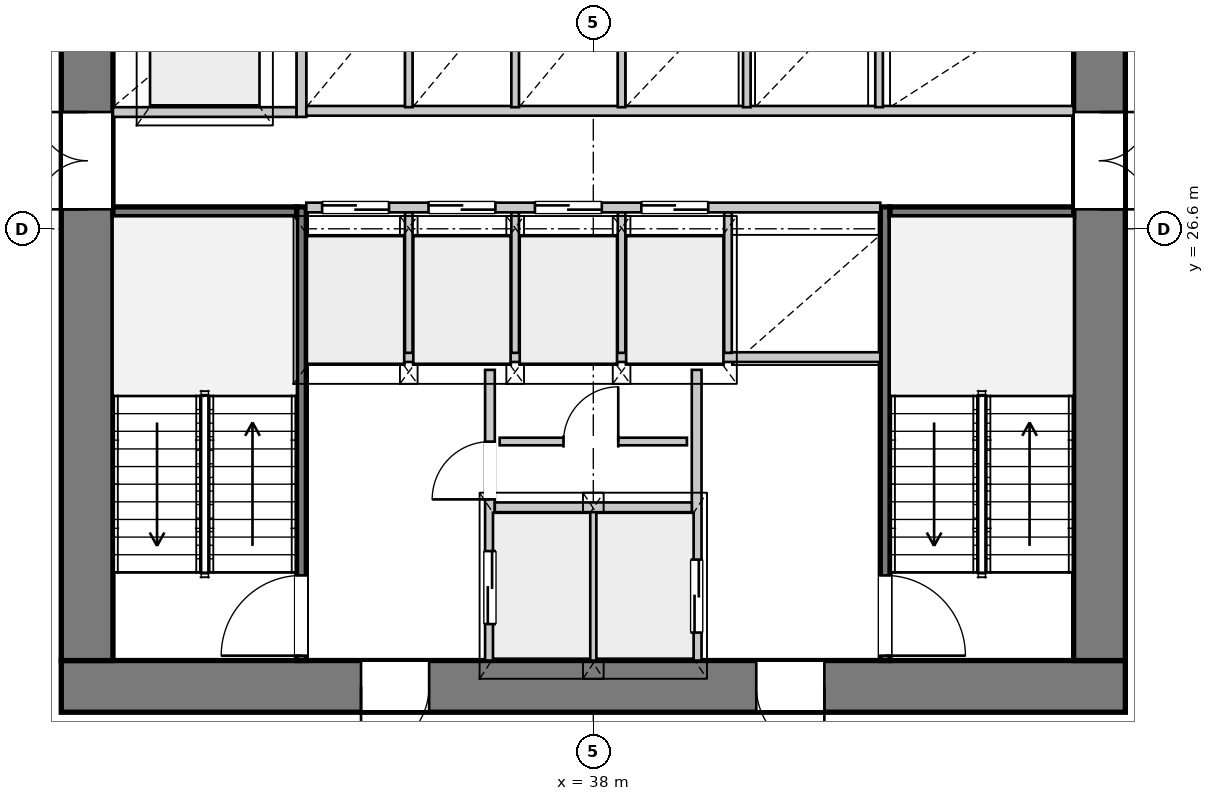
"""IFC4 building model, lengths in metres.
Left out: names, types, materials, properties, quantities, classifications, styles, units other than length and angle.
Written with IfcOpenShell. Run it as: python <this file> out.ifc"""

import sys

from ifc_helpers import new_model, si_unit, direction, frame, frame_2d, origin, place, context, subcontext, project, spatial, rectangle, extrude, source, transform, mapped, element, fill, save


model = new_model("IFC4")
c1 = context("Model", 3, precision=1e-05, world=origin(), true_north=direction((0.0, 1.0)))
c2 = subcontext(c1, "Body", "Model", "MODEL_VIEW")
j1 = project(units=[si_unit("LENGTHUNIT", "METRE"), si_unit("PLANEANGLEUNIT", "RADIAN")], contexts=[c1])
p1 = place(None, origin())
s1 = spatial("IfcSite", under=j1, at=p1, CompositionType="ELEMENT")
p2 = place(p1, origin())
s2 = spatial("IfcBuilding", under=s1, at=p2, CompositionType="ELEMENT")
p3 = place(p2, frame((0.0, 0.0, 57.7)))
s3 = spatial("IfcBuildingStorey", under=s2, at=p3, CompositionType="ELEMENT", Elevation=57.7)
p4 = place(p3, frame((46.75, 19.075, 0.0), z_axis=(0.0, 0.0, 1.0), x_axis=(-1.0, 0.0, 0.0)))
e1 = element("IfcWall", 1, at=p4, inside=s3, PredefinedType="SHEAR", context=c2, shape_type="SweptSolid", body=[
    extrude(rectangle(XDim=17.5, YDim=0.85, at=frame_2d((8.75, 0.0))), origin(), (0.0, 0.0, 1.0), 3.3),
])
p5 = place(p4, frame((4.95, 0.0, 0.0)))
e2 = element("IfcOpeningElement", 2, at=p5, cuts=e1, PredefinedType="OPENING", context=c2, shape_type="SweptSolid", body=[
    extrude(rectangle(XDim=1.12, YDim=2.25, at=frame_2d((0.56, 1.125))), frame((0.0, 0.435, 0.0), z_axis=(0.0, -1.0, 0.0), x_axis=(1.0, 0.0, 0.0)), (0.0, 0.0, 1.0), 0.87),
])
p6 = place(p4, frame((11.45, 0.0, 0.0)))
e3 = element("IfcOpeningElement", 3, at=p6, cuts=e1, PredefinedType="OPENING", context=c2, shape_type="SweptSolid", body=[
    extrude(rectangle(XDim=1.12, YDim=2.25, at=frame_2d((0.56, 1.125))), frame((0.0, 0.435, 0.0), z_axis=(0.0, -1.0, 0.0), x_axis=(1.0, 0.0, 0.0)), (0.0, 0.0, 1.0), 0.87),
])
p7 = place(p3, frame((29.675, 19.5, 0.0), z_axis=(0.0, 0.0, 1.0), x_axis=(0.0, 1.0, 0.0)))
e4 = element("IfcWall", 4, at=p7, inside=s3, PredefinedType="SHEAR", context=c2, shape_type="SweptSolid", body=[
    extrude(rectangle(XDim=14.2, YDim=0.85, at=frame_2d((7.1, 0.0))), origin(), (0.0, 0.0, 1.0), 3.3),
])
p8 = place(p7, frame((7.42, 0.0, 0.0)))
e5 = element("IfcOpeningElement", 5, at=p8, cuts=e4, PredefinedType="OPENING", context=c2, shape_type="SweptSolid", body=[
    extrude(rectangle(XDim=1.6, YDim=2.2, at=frame_2d((0.8, 1.1))), frame((0.0, 0.435, 0.0), z_axis=(0.0, -1.0, 0.0), x_axis=(1.0, 0.0, 0.0)), (0.0, 0.0, 1.0), 0.87),
])
p9 = place(p3, frame((46.325, 33.7, 0.0), z_axis=(0.0, 0.0, 1.0), x_axis=(0.0, -1.0, 0.0)))
e6 = element("IfcWall", 6, at=p9, inside=s3, PredefinedType="SHEAR", context=c2, shape_type="SweptSolid", body=[
    extrude(rectangle(XDim=14.2, YDim=0.85, at=frame_2d((7.1, 0.0))), origin(), (0.0, 0.0, 1.0), 3.3),
])
p10 = place(p9, frame((5.18, 0.0, 0.0)))
e7 = element("IfcOpeningElement", 7, at=p10, cuts=e6, PredefinedType="OPENING", context=c2, shape_type="SweptSolid", body=[
    extrude(rectangle(XDim=1.6, YDim=2.2, at=frame_2d((0.8, 1.1))), frame((0.0, 0.435, 0.0), z_axis=(0.0, -1.0, 0.0), x_axis=(1.0, 0.0, 0.0)), (0.0, 0.0, 1.0), 0.87),
])
p11 = place(p3, frame((33.2, 19.5, 0.0), z_axis=(0.0, 0.0, 1.0), x_axis=(0.0, 1.0, 0.0)))
e8 = element("IfcWall", 8, at=p11, inside=s3, PredefinedType="PARTITIONING", context=c2, shape_type="SweptSolid", body=[
    extrude(rectangle(XDim=7.46, YDim=0.16, at=frame_2d((3.73, 0.0))), origin(), (0.0, 0.0, 1.0), 3.3),
])
p12 = place(p11, frame((0.08, 0.0, 0.0)))
e9 = element("IfcOpeningElement", 9, at=p12, cuts=e8, PredefinedType="OPENING", context=c2, shape_type="SweptSolid", body=[
    extrude(rectangle(XDim=1.32, YDim=2.2, at=frame_2d((0.66, 1.1))), frame((0.0, 0.09, 0.0), z_axis=(0.0, -1.0, 0.0), x_axis=(1.0, 0.0, 0.0)), (0.0, 0.0, 1.0), 0.18),
])
p13 = place(p3, frame((30.1, 26.88, 0.0), z_axis=(0.0, 0.0, 1.0), x_axis=(1.0, 0.0, 0.0)))
e10 = element("IfcWall", 10, at=p13, inside=s3, PredefinedType="PARTITIONING", context=c2, shape_type="SweptSolid", body=[
    extrude(rectangle(XDim=3.02, YDim=0.16, at=frame_2d((1.51, 0.0))), origin(), (0.0, 0.0, 1.0), 3.3),
])
p14 = place(p3, frame((42.8, 26.96, 0.0), z_axis=(0.0, 0.0, 1.0), x_axis=(0.0, -1.0, 0.0)))
e11 = element("IfcWall", 11, at=p14, inside=s3, PredefinedType="PARTITIONING", context=c2, shape_type="SweptSolid", body=[
    extrude(rectangle(XDim=7.46, YDim=0.16, at=frame_2d((3.73, 0.0))), origin(), (0.0, 0.0, 1.0), 3.3),
])
p15 = place(p14, frame((6.06, 0.0, 0.0)))
e12 = element("IfcOpeningElement", 12, at=p15, cuts=e11, PredefinedType="OPENING", context=c2, shape_type="SweptSolid", body=[
    extrude(rectangle(XDim=1.32, YDim=2.2, at=frame_2d((0.66, 1.1))), frame((0.0, 0.09, 0.0), z_axis=(0.0, -1.0, 0.0), x_axis=(1.0, 0.0, 0.0)), (0.0, 0.0, 1.0), 0.18),
])
p16 = place(p3, frame((42.88, 26.88, 0.0), z_axis=(0.0, 0.0, 1.0), x_axis=(1.0, 0.0, 0.0)))
e13 = element("IfcWall", 13, at=p16, inside=s3, PredefinedType="PARTITIONING", context=c2, shape_type="SweptSolid", body=[
    extrude(rectangle(XDim=3.02, YDim=0.16, at=frame_2d((1.51, 0.0))), origin(), (0.0, 0.0, 1.0), 3.3),
])
p17 = place(p3, frame((36.3, 19.5, 0.0), z_axis=(0.0, 0.0, 1.0), x_axis=(0.0, 1.0, 0.0)))
e14 = element("IfcWall", 14, at=p17, inside=s3, PredefinedType="PARTITIONING", context=c2, shape_type="SweptSolid", body=[
    extrude(rectangle(XDim=4.78, YDim=0.16, at=frame_2d((2.39, 0.0))), origin(), (0.0, 0.0, 1.0), 3.3),
])
p18 = place(p17, frame((0.6, 0.0, 0.0)))
e15 = element("IfcOpeningElement", 15, at=p18, cuts=e14, PredefinedType="OPENING", context=c2, shape_type="SweptSolid", body=[
    extrude(rectangle(XDim=1.2, YDim=2.2, at=frame_2d((0.6, 1.1))), frame((0.0, 0.09, 0.0), z_axis=(0.0, -1.0, 0.0), x_axis=(1.0, 0.0, 0.0)), (0.0, 0.0, 1.0), 0.18),
])
p19 = place(p17, frame((2.65, 0.0, 0.0)))
e16 = element("IfcOpeningElement", 16, at=p19, cuts=e14, PredefinedType="OPENING", context=c2, shape_type="SweptSolid", body=[
    extrude(rectangle(XDim=0.95, YDim=2.1, at=frame_2d((0.475, 1.05))), frame((0.0, 0.09, 0.0), z_axis=(0.0, -1.0, 0.0), x_axis=(1.0, 0.0, 0.0)), (0.0, 0.0, 1.0), 0.18),
])
p20 = place(p3, frame((39.7, 24.28, 0.0), z_axis=(0.0, 0.0, 1.0), x_axis=(0.0, -1.0, 0.0)))
e17 = element("IfcWall", 17, at=p20, inside=s3, PredefinedType="PARTITIONING", context=c2, shape_type="SweptSolid", body=[
    extrude(rectangle(XDim=4.78, YDim=0.16, at=frame_2d((2.39, 0.0))), origin(), (0.0, 0.0, 1.0), 3.3),
])
p21 = place(p20, frame((3.12, 0.0, 0.0)))
e18 = element("IfcOpeningElement", 18, at=p21, cuts=e17, PredefinedType="OPENING", context=c2, shape_type="SweptSolid", body=[
    extrude(rectangle(XDim=1.2, YDim=2.2, at=frame_2d((0.6, 1.1))), frame((0.0, 0.09, 0.0), z_axis=(0.0, -1.0, 0.0), x_axis=(1.0, 0.0, 0.0)), (0.0, 0.0, 1.0), 0.18),
])
p22 = place(p3, frame((38.0, 19.5, 0.0), z_axis=(0.0, 0.0, 1.0), x_axis=(0.0, 1.0, 0.0)))
e19 = element("IfcWall", 19, at=p22, inside=s3, PredefinedType="PARTITIONING", context=c2, shape_type="SweptSolid", body=[
    extrude(rectangle(XDim=2.46, YDim=0.125, at=frame_2d((1.23, 0.0))), origin(), (0.0, 0.0, 1.0), 3.3),
])
p23 = place(p3, frame((36.38, 22.02, 0.0), z_axis=(0.0, 0.0, 1.0), x_axis=(1.0, 0.0, 0.0)))
e20 = element("IfcWall", 20, at=p23, inside=s3, PredefinedType="PARTITIONING", context=c2, shape_type="SweptSolid", body=[
    extrude(rectangle(XDim=3.24, YDim=0.16, at=frame_2d((1.62, 0.0))), origin(), (0.0, 0.0, 1.0), 3.3),
])
p24 = place(p3, frame((33.28, 24.49, 0.0), z_axis=(0.0, 0.0, 1.0), x_axis=(1.0, 0.0, 0.0)))
e21 = element("IfcWall", 21, at=p24, inside=s3, PredefinedType="PARTITIONING", context=c2, shape_type="SweptSolid", body=[
    extrude(rectangle(XDim=9.44, YDim=0.16, at=frame_2d((4.72, 0.0))), origin(), (0.0, 0.0, 1.0), 3.3),
])
p25 = place(p3, frame((36.46, 23.102, 0.0), z_axis=(0.0, 0.0, 1.0), x_axis=(1.0, 0.0, 0.0)))
e22 = element("IfcWall", 22, at=p25, inside=s3, PredefinedType="PARTITIONING", context=c2, shape_type="SweptSolid", body=[
    extrude(rectangle(XDim=3.08, YDim=0.125, at=frame_2d((1.54, 0.0))), origin(), (0.0, 0.0, 1.0), 3.3),
])
p26 = place(p25, frame((1.05, 0.0, 0.0)))
e23 = element("IfcOpeningElement", 23, at=p26, cuts=e22, PredefinedType="OPENING", context=c2, shape_type="SweptSolid", body=[
    extrude(rectangle(XDim=0.9, YDim=2.1, at=frame_2d((0.45, 1.05))), frame((0.0, 0.073, 0.0), z_axis=(0.0, -1.0, 0.0), x_axis=(1.0, 0.0, 0.0)), (0.0, 0.0, 1.0), 0.145),
])
p27 = place(p3, frame((30.1, 28.52, 0.0), z_axis=(0.0, 0.0, 1.0), x_axis=(1.0, 0.0, 0.0)))
e24 = element("IfcWall", 24, at=p27, inside=s3, PredefinedType="PARTITIONING", context=c2, shape_type="SweptSolid", body=[
    extrude(rectangle(XDim=3.02, YDim=0.16, at=frame_2d((1.51, 0.0))), origin(), (0.0, 0.0, 1.0), 3.3),
])
p28 = place(p3, frame((33.2, 28.44, 0.0), z_axis=(0.0, 0.0, 1.0), x_axis=(0.0, 1.0, 0.0)))
e25 = element("IfcWall", 25, at=p28, inside=s3, PredefinedType="PARTITIONING", context=c2, shape_type="SweptSolid", body=[
    extrude(rectangle(XDim=5.26, YDim=0.16, at=frame_2d((2.63, 0.0))), origin(), (0.0, 0.0, 1.0), 3.3),
])
p29 = place(p3, frame((33.28, 26.95, 0.0), z_axis=(0.0, 0.0, 1.0), x_axis=(1.0, 0.0, 0.0)))
e26 = element("IfcWall", 26, at=p29, inside=s3, PredefinedType="PARTITIONING", context=c2, shape_type="SweptSolid", body=[
    extrude(rectangle(XDim=9.44, YDim=0.16, at=frame_2d((4.72, 0.0))), origin(), (0.0, 0.0, 1.0), 3.3),
])
p30 = place(p29, frame((0.26, 0.0, 0.0)))
e27 = element("IfcOpeningElement", 27, at=p30, cuts=e26, PredefinedType="OPENING", context=c2, shape_type="SweptSolid", body=[
    extrude(rectangle(XDim=1.1, YDim=2.2, at=frame_2d((0.55, 1.1))), frame((0.0, 0.09, 0.0), z_axis=(0.0, -1.0, 0.0), x_axis=(1.0, 0.0, 0.0)), (0.0, 0.0, 1.0), 0.18),
])
p31 = place(p29, frame((2.01, 0.0, 0.0)))
e28 = element("IfcOpeningElement", 28, at=p31, cuts=e26, PredefinedType="OPENING", context=c2, shape_type="SweptSolid", body=[
    extrude(rectangle(XDim=1.1, YDim=2.2, at=frame_2d((0.55, 1.1))), frame((0.0, 0.09, 0.0), z_axis=(0.0, -1.0, 0.0), x_axis=(1.0, 0.0, 0.0)), (0.0, 0.0, 1.0), 0.18),
])
p32 = place(p29, frame((3.76, 0.0, 0.0)))
e29 = element("IfcOpeningElement", 29, at=p32, cuts=e26, PredefinedType="OPENING", context=c2, shape_type="SweptSolid", body=[
    extrude(rectangle(XDim=1.1, YDim=2.2, at=frame_2d((0.55, 1.1))), frame((0.0, 0.09, 0.0), z_axis=(0.0, -1.0, 0.0), x_axis=(1.0, 0.0, 0.0)), (0.0, 0.0, 1.0), 0.18),
])
p33 = place(p29, frame((5.51, 0.0, 0.0)))
e30 = element("IfcOpeningElement", 30, at=p33, cuts=e26, PredefinedType="OPENING", context=c2, shape_type="SweptSolid", body=[
    extrude(rectangle(XDim=1.1, YDim=2.2, at=frame_2d((0.55, 1.1))), frame((0.0, 0.09, 0.0), z_axis=(0.0, -1.0, 0.0), x_axis=(1.0, 0.0, 0.0)), (0.0, 0.0, 1.0), 0.18),
])
for number, where, z_axis, x_axis in (
    (31, (34.965, 24.56, 0.0), (0.0, 0.0, 1.0), (0.0, 1.0, 0.0)),
    (32, (36.715, 24.56, 0.0), (0.0, 0.0, 1.0), (0.0, 1.0, 0.0)),
    (33, (38.465, 24.56, 0.0), (0.0, 0.0, 1.0), (0.0, 1.0, 0.0)),
    (34, (40.215, 24.56, 0.0), (0.0, 0.0, 1.0), (0.0, 1.0, 0.0)),
):
    element("IfcWall", number, at=place(p3, frame(where, z_axis=z_axis, x_axis=x_axis)), inside=s3, PredefinedType="PARTITIONING", context=c2, shape_type="SweptSolid", body=[
        extrude(rectangle(XDim=2.31, YDim=0.125, at=frame_2d((1.155, 0.0))), origin(), (0.0, 0.0, 1.0), 3.3),
    ])
p34 = place(p3, frame((33.28, 28.54, 0.0), z_axis=(0.0, 0.0, 1.0), x_axis=(1.0, 0.0, 0.0)))
e35 = element("IfcWall", 35, at=p34, inside=s3, PredefinedType="PARTITIONING", context=c2, shape_type="SweptSolid", body=[
    extrude(rectangle(XDim=12.62, YDim=0.16, at=frame_2d((6.31, 0.0))), origin(), (0.0, 0.0, 1.0), 3.3),
])
for number, where, z_axis, x_axis in (
    (36, (34.965, 28.6, 0.0), (0.0, 0.0, 1.0), (0.0, 1.0, 0.0)),
    (37, (36.715, 28.6, 0.0), (0.0, 0.0, 1.0), (0.0, 1.0, 0.0)),
    (38, (38.465, 28.6, 0.0), (0.0, 0.0, 1.0), (0.0, 1.0, 0.0)),
    (39, (40.525, 28.6, 0.0), (0.0, 0.0, 1.0), (0.0, 1.0, 0.0)),
    (40, (42.7, 28.6, 0.0), (0.0, 0.0, 1.0), (0.0, 1.0, 0.0)),
):
    element("IfcWall", number, at=place(p3, frame(where, z_axis=z_axis, x_axis=x_axis)), inside=s3, PredefinedType="PARTITIONING", context=c2, shape_type="SweptSolid", body=[
        extrude(rectangle(XDim=1.92, YDim=0.125, at=frame_2d((0.96, 0.0))), origin(), (0.0, 0.0, 1.0), 3.3),
    ])
m1 = source(origin(), c2, "Body", "SweptSolid", [
    extrude(rectangle(XDim=1.12, YDim=2.25, at=frame_2d((0.56, 1.125))), frame((0.0, 0.025, 0.0), z_axis=(0.0, -1.0, 0.0), x_axis=(1.0, 0.0, 0.0)), (0.0, 0.0, 1.0), 0.05),
])
p35 = place(p5, origin())
e41 = element("IfcDoor", 41, at=p35, inside=s3, OperationType="SINGLE_SWING_LEFT", PredefinedType="DOOR", context=c2, shape_type="MappedRepresentation", body=[
    mapped(m1, transform((0.0, 0.0, 0.0), x_axis=(1.0, 0.0, 0.0), y_axis=(0.0, 1.0, 0.0), z_axis=(0.0, 0.0, 1.0), scale=1.0)),
])
fill(e2, e41)
p36 = place(p6, origin())
e42 = element("IfcDoor", 42, at=p36, inside=s3, OperationType="SINGLE_SWING_RIGHT", PredefinedType="DOOR", context=c2, shape_type="MappedRepresentation", body=[
    mapped(m1, transform((0.0, 0.0, 0.0), x_axis=(1.0, 0.0, 0.0), y_axis=(0.0, 1.0, 0.0), z_axis=(0.0, 0.0, 1.0), scale=1.0)),
])
fill(e3, e42)
m2 = source(origin(), c2, "Body", "SweptSolid", [
    extrude(rectangle(XDim=1.6, YDim=2.2, at=frame_2d((0.8, 1.1))), frame((0.0, 0.025, 0.0), z_axis=(0.0, -1.0, 0.0), x_axis=(1.0, 0.0, 0.0)), (0.0, 0.0, 1.0), 0.05),
])
p37 = place(p8, origin())
e43 = element("IfcDoor", 43, at=p37, inside=s3, OperationType="DOUBLE_DOOR_SINGLE_SWING", PredefinedType="DOOR", context=c2, shape_type="MappedRepresentation", body=[
    mapped(m2, transform((0.0, 0.0, 0.0), x_axis=(1.0, 0.0, 0.0), y_axis=(0.0, 1.0, 0.0), z_axis=(0.0, 0.0, 1.0), scale=1.0)),
])
fill(e5, e43)
p38 = place(p10, origin())
e44 = element("IfcDoor", 44, at=p38, inside=s3, OperationType="DOUBLE_DOOR_SINGLE_SWING", PredefinedType="DOOR", context=c2, shape_type="MappedRepresentation", body=[
    mapped(m2, transform((0.0, 0.0, 0.0), x_axis=(1.0, 0.0, 0.0), y_axis=(0.0, 1.0, 0.0), z_axis=(0.0, 0.0, 1.0), scale=1.0)),
])
fill(e7, e44)
m3 = source(origin(), c2, "Body", "SweptSolid", [
    extrude(rectangle(XDim=1.32, YDim=2.2, at=frame_2d((0.66, 1.1))), frame((0.0, 0.025, 0.0), z_axis=(0.0, -1.0, 0.0), x_axis=(1.0, 0.0, 0.0)), (0.0, 0.0, 1.0), 0.05),
])
p39 = place(p12, origin())
e45 = element("IfcDoor", 45, at=p39, inside=s3, OperationType="SINGLE_SWING_LEFT", PredefinedType="DOOR", context=c2, shape_type="MappedRepresentation", body=[
    mapped(m3, transform((0.0, 0.0, 0.0), x_axis=(1.0, 0.0, 0.0), y_axis=(0.0, 1.0, 0.0), z_axis=(0.0, 0.0, 1.0), scale=1.0)),
])
fill(e9, e45)
p40 = place(p15, origin())
e46 = element("IfcDoor", 46, at=p40, inside=s3, OperationType="SINGLE_SWING_RIGHT", PredefinedType="DOOR", context=c2, shape_type="MappedRepresentation", body=[
    mapped(m3, transform((0.0, 0.0, 0.0), x_axis=(1.0, 0.0, 0.0), y_axis=(0.0, 1.0, 0.0), z_axis=(0.0, 0.0, 1.0), scale=1.0)),
])
fill(e12, e46)
m4 = source(origin(), c2, "Body", "SweptSolid", [
    extrude(rectangle(XDim=1.2, YDim=2.2, at=frame_2d((0.6, 1.1))), frame((0.0, 0.025, 0.0), z_axis=(0.0, -1.0, 0.0), x_axis=(1.0, 0.0, 0.0)), (0.0, 0.0, 1.0), 0.05),
])
p41 = place(p18, origin())
e47 = element("IfcDoor", 47, at=p41, inside=s3, OperationType="DOUBLE_DOOR_SLIDING", PredefinedType="DOOR", context=c2, shape_type="MappedRepresentation", body=[
    mapped(m4, transform((0.0, 0.0, 0.0), x_axis=(1.0, 0.0, 0.0), y_axis=(0.0, 1.0, 0.0), z_axis=(0.0, 0.0, 1.0), scale=1.0)),
])
fill(e15, e47)
m5 = source(origin(), c2, "Body", "SweptSolid", [
    extrude(rectangle(XDim=0.95, YDim=2.1, at=frame_2d((0.475, 1.05))), frame((0.0, 0.025, 0.0), z_axis=(0.0, -1.0, 0.0), x_axis=(1.0, 0.0, 0.0)), (0.0, 0.0, 1.0), 0.05),
])
p42 = place(p19, origin())
e48 = element("IfcDoor", 48, at=p42, inside=s3, OperationType="SINGLE_SWING_LEFT", PredefinedType="DOOR", context=c2, shape_type="MappedRepresentation", body=[
    mapped(m5, transform((0.0, 0.0, 0.0), x_axis=(1.0, 0.0, 0.0), y_axis=(0.0, 1.0, 0.0), z_axis=(0.0, 0.0, 1.0), scale=1.0)),
])
fill(e16, e48)
m6 = source(origin(), c2, "Body", "SweptSolid", [
    extrude(rectangle(XDim=0.9, YDim=2.1, at=frame_2d((0.45, 1.05))), frame((0.0, 0.025, 0.0), z_axis=(0.0, -1.0, 0.0), x_axis=(1.0, 0.0, 0.0)), (0.0, 0.0, 1.0), 0.05),
])
p43 = place(p26, origin())
e49 = element("IfcDoor", 49, at=p43, inside=s3, OperationType="SINGLE_SWING_RIGHT", PredefinedType="DOOR", context=c2, shape_type="MappedRepresentation", body=[
    mapped(m6, transform((0.0, 0.0, 0.0), x_axis=(1.0, 0.0, 0.0), y_axis=(0.0, 1.0, 0.0), z_axis=(0.0, 0.0, 1.0), scale=1.0)),
])
fill(e23, e49)
p44 = place(p21, origin())
e50 = element("IfcDoor", 50, at=p44, inside=s3, OperationType="DOUBLE_DOOR_SLIDING", PredefinedType="DOOR", context=c2, shape_type="MappedRepresentation", body=[
    mapped(m4, transform((0.0, 0.0, 0.0), x_axis=(1.0, 0.0, 0.0), y_axis=(0.0, 1.0, 0.0), z_axis=(0.0, 0.0, 1.0), scale=1.0)),
])
fill(e18, e50)
m7 = source(origin(), c2, "Body", "SweptSolid", [
    extrude(rectangle(XDim=1.1, YDim=2.2, at=frame_2d((0.55, 1.1))), frame((0.0, 0.025, 0.0), z_axis=(0.0, -1.0, 0.0), x_axis=(1.0, 0.0, 0.0)), (0.0, 0.0, 1.0), 0.05),
])
p45 = place(p30, origin())
e51 = element("IfcDoor", 51, at=p45, inside=s3, OperationType="DOUBLE_DOOR_SLIDING", PredefinedType="DOOR", context=c2, shape_type="MappedRepresentation", body=[
    mapped(m7, transform((0.0, 0.0, 0.0), x_axis=(1.0, 0.0, 0.0), y_axis=(0.0, 1.0, 0.0), z_axis=(0.0, 0.0, 1.0), scale=1.0)),
])
fill(e27, e51)
p46 = place(p31, origin())
e52 = element("IfcDoor", 52, at=p46, inside=s3, OperationType="DOUBLE_DOOR_SLIDING", PredefinedType="DOOR", context=c2, shape_type="MappedRepresentation", body=[
    mapped(m7, transform((0.0, 0.0, 0.0), x_axis=(1.0, 0.0, 0.0), y_axis=(0.0, 1.0, 0.0), z_axis=(0.0, 0.0, 1.0), scale=1.0)),
])
fill(e28, e52)
p47 = place(p32, origin())
e53 = element("IfcDoor", 53, at=p47, inside=s3, OperationType="DOUBLE_DOOR_SLIDING", PredefinedType="DOOR", context=c2, shape_type="MappedRepresentation", body=[
    mapped(m7, transform((0.0, 0.0, 0.0), x_axis=(1.0, 0.0, 0.0), y_axis=(0.0, 1.0, 0.0), z_axis=(0.0, 0.0, 1.0), scale=1.0)),
])
fill(e29, e53)
p48 = place(p33, origin())
e54 = element("IfcDoor", 54, at=p48, inside=s3, OperationType="DOUBLE_DOOR_SLIDING", PredefinedType="DOOR", context=c2, shape_type="MappedRepresentation", body=[
    mapped(m7, transform((0.0, 0.0, 0.0), x_axis=(1.0, 0.0, 0.0), y_axis=(0.0, 1.0, 0.0), z_axis=(0.0, 0.0, 1.0), scale=1.0)),
])
fill(e30, e54)
save(model, sys.argv[1])
